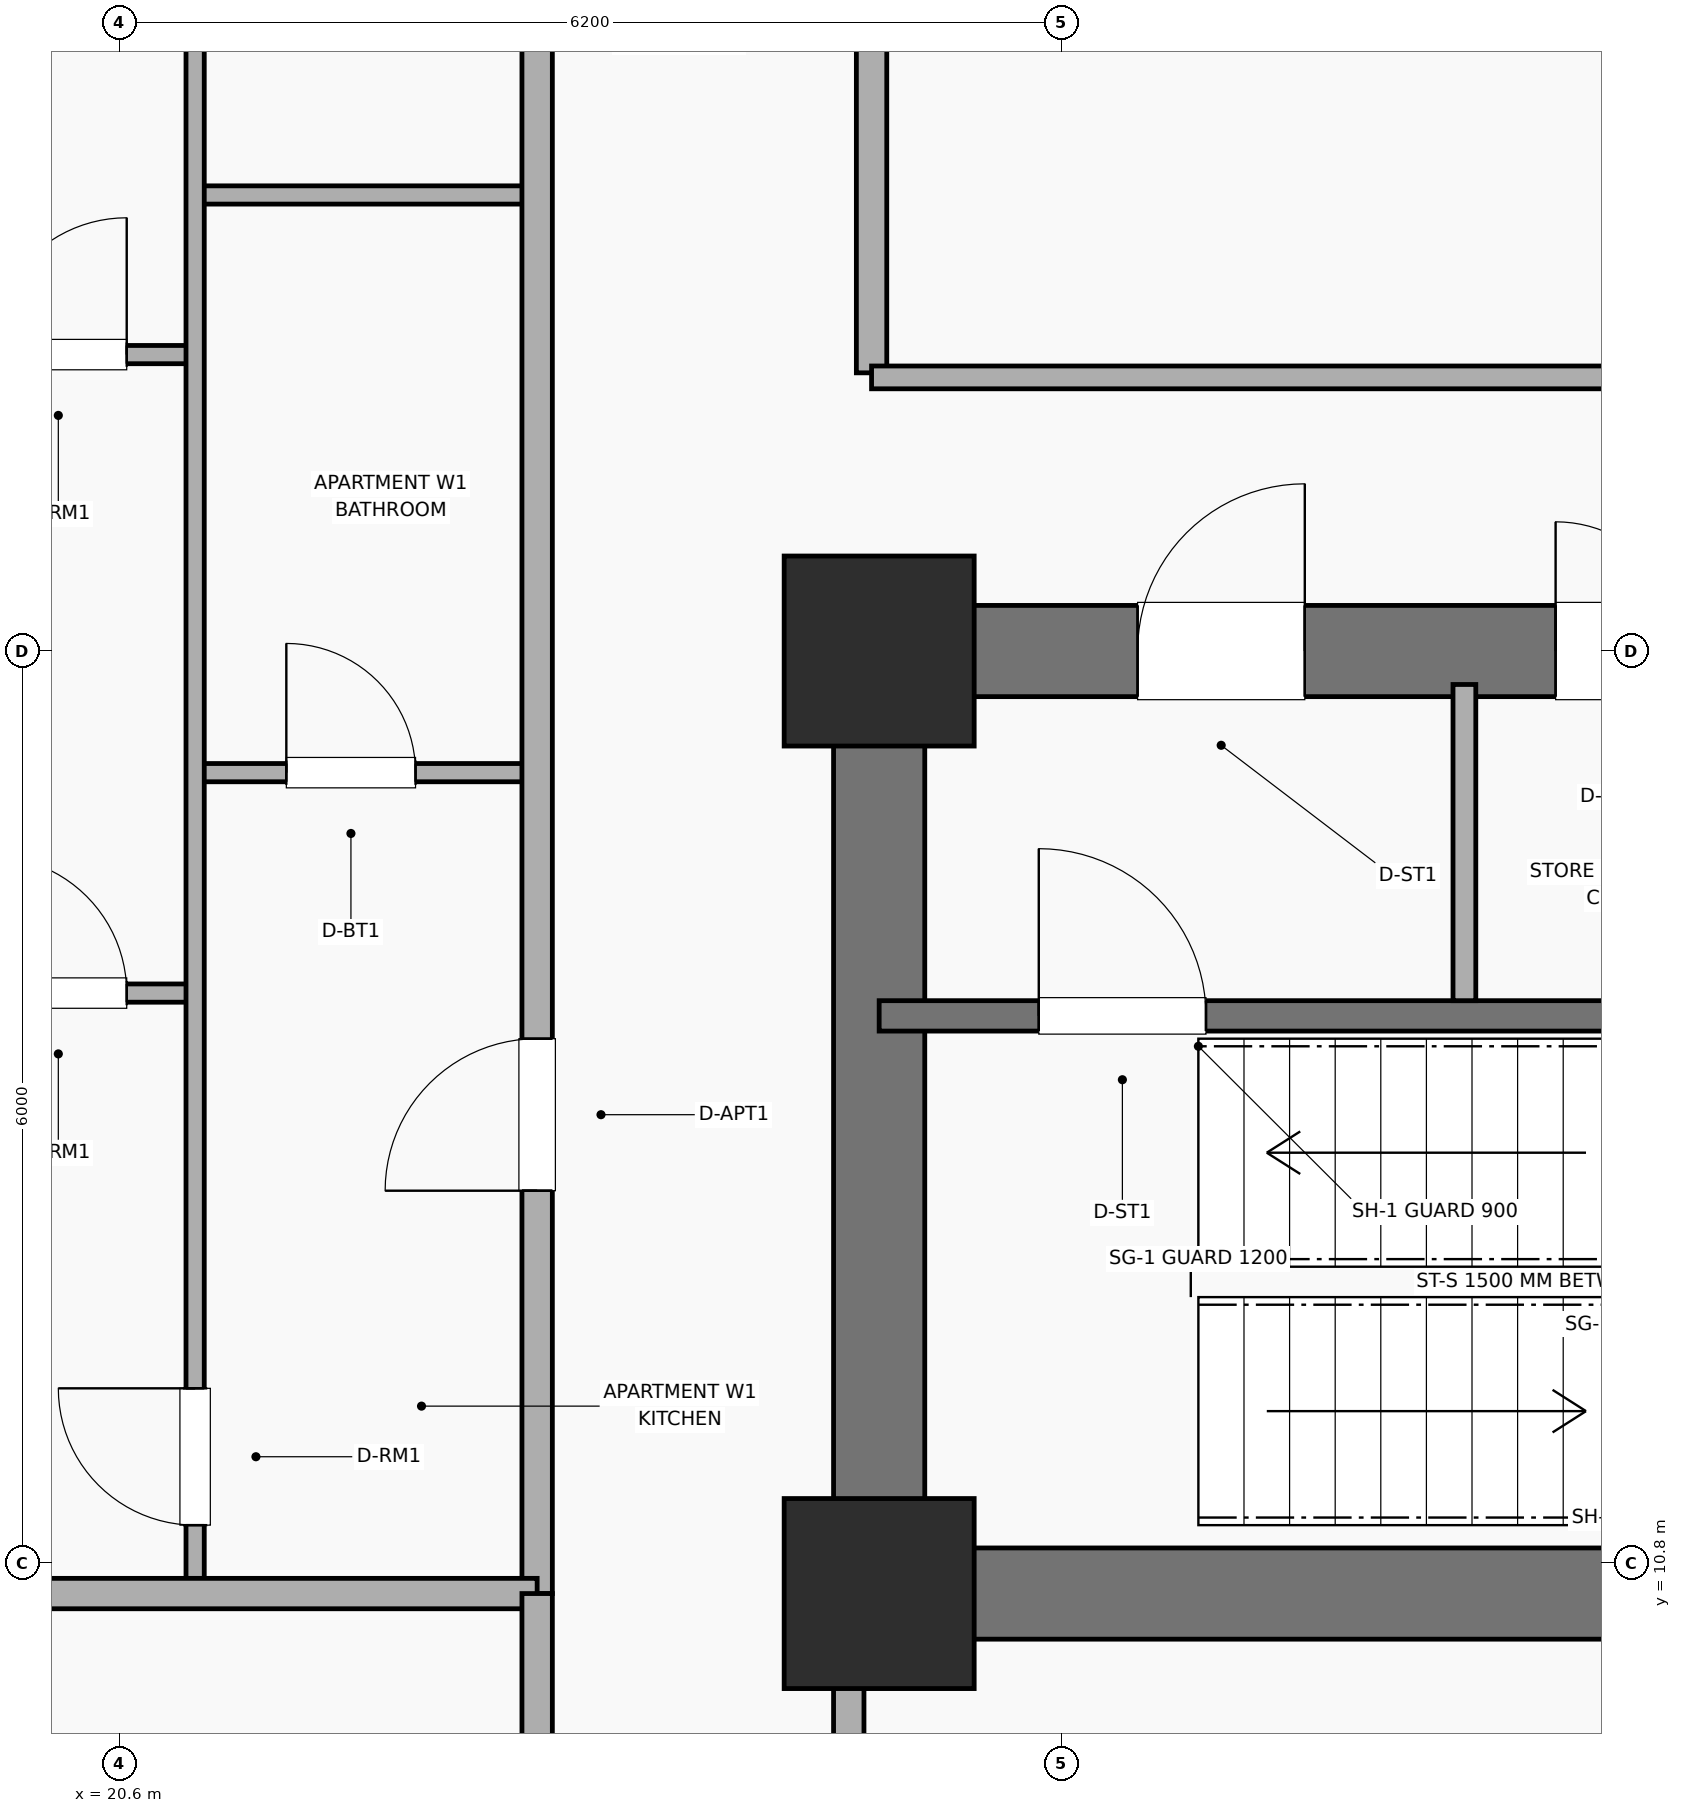
"""IFC4 building model, lengths in metres.
Left out: names, types, materials, properties, quantities, classifications, styles, units other than length and angle.
Written with IfcOpenShell. Run it as: python <this file> out.ifc"""

import sys

from ifc_helpers import new_model, si_unit, direction, frame, frame_2d, origin, origin_2d, place, context, subcontext, project, spatial, rectangle, extrude, element, fill, save


model = new_model("IFC4")
c1 = context("Model", 3, precision=1e-05, world=origin(), true_north=direction((0.0, 1.0)))
c2 = subcontext(c1, "Body", "Model", "MODEL_VIEW")
j1 = project(units=[si_unit("LENGTHUNIT", "METRE"), si_unit("PLANEANGLEUNIT", "RADIAN")], contexts=[c1])
p1 = place(None, origin())
s1 = spatial("IfcSite", under=j1, at=p1, CompositionType="ELEMENT")
p2 = place(p1, origin())
s2 = spatial("IfcBuilding", under=s1, at=p2, CompositionType="ELEMENT")
p3 = place(p2, frame((0.0, 0.0, 36.2)))
s3 = spatial("IfcBuildingStorey", under=s2, at=p3, CompositionType="ELEMENT", Elevation=36.2)
p4 = place(p3, frame((52.8, 10.6, 0.0), z_axis=(0.0, 0.0, 1.0), x_axis=(-1.0, 0.0, 0.0)))
e1 = element("IfcWall", 1, at=p4, inside=s3, PredefinedType="SHEAR", context=c2, shape_type="SweptSolid", body=[
    extrude(rectangle(XDim=27.2, YDim=0.6, at=frame_2d((13.6, 0.0))), origin(), (0.0, 0.0, 1.0), 3.7),
])
p5 = place(p3, frame((25.6, 10.9, 0.0), z_axis=(0.0, 0.0, 1.0), x_axis=(0.0, 1.0, 0.0)))
e2 = element("IfcWall", 2, at=p5, inside=s3, PredefinedType="SHEAR", context=c2, shape_type="SweptSolid", body=[
    extrude(rectangle(XDim=5.6, YDim=0.6, at=frame_2d((2.8, 0.0))), origin(), (0.0, 0.0, 1.0), 3.7),
])
p6 = place(p3, frame((25.6, 16.8, 0.0), z_axis=(0.0, 0.0, 1.0), x_axis=(1.0, 0.0, 0.0)))
e3 = element("IfcWall", 3, at=p6, inside=s3, PredefinedType="SHEAR", context=c2, shape_type="SweptSolid", body=[
    extrude(rectangle(XDim=27.2, YDim=0.6, at=frame_2d((13.6, 0.0))), origin(), (0.0, 0.0, 1.0), 3.7),
])
p7 = place(p6, frame((1.7, 0.0, 0.0)))
e4 = element("IfcOpeningElement", 4, at=p7, cuts=e3, PredefinedType="OPENING", context=c2, shape_type="SweptSolid", body=[
    extrude(rectangle(XDim=1.1, YDim=2.15, at=frame_2d((0.55, 1.075))), frame((0.0, 0.31, 0.0), z_axis=(0.0, -1.0, 0.0), x_axis=(1.0, 0.0, 0.0)), (0.0, 0.0, 1.0), 0.62),
])
p8 = place(p6, frame((4.45, 0.0, 0.0)))
e5 = element("IfcOpeningElement", 5, at=p8, cuts=e3, PredefinedType="OPENING", context=c2, shape_type="SweptSolid", body=[
    extrude(rectangle(XDim=0.85, YDim=2.1, at=frame_2d((0.425, 1.05))), frame((0.0, 0.31, 0.0), z_axis=(0.0, -1.0, 0.0), x_axis=(1.0, 0.0, 0.0)), (0.0, 0.0, 1.0), 0.62),
])
p9 = place(p6, frame((6.5, 0.0, 0.0)))
e6 = element("IfcOpeningElement", 6, at=p9, cuts=e3, PredefinedType="OPENING", context=c2, shape_type="SweptSolid", body=[
    extrude(rectangle(XDim=0.85, YDim=2.1, at=frame_2d((0.425, 1.05))), frame((0.0, 0.31, 0.0), z_axis=(0.0, -1.0, 0.0), x_axis=(1.0, 0.0, 0.0)), (0.0, 0.0, 1.0), 0.62),
])
p10 = place(p6, frame((13.0, 0.0, 0.0)))
e7 = element("IfcOpeningElement", 7, at=p10, cuts=e3, PredefinedType="OPENING", context=c2, shape_type="SweptSolid", body=[
    extrude(rectangle(XDim=1.2, YDim=2.15, at=frame_2d((0.6, 1.075))), frame((0.0, 0.31, 0.0), z_axis=(0.0, -1.0, 0.0), x_axis=(1.0, 0.0, 0.0)), (0.0, 0.0, 1.0), 0.62),
])
p11 = place(p6, frame((20.4, 0.0, 0.0)))
e8 = element("IfcOpeningElement", 8, at=p11, cuts=e3, PredefinedType="OPENING", context=c2, shape_type="SweptSolid", body=[
    extrude(rectangle(XDim=1.3, YDim=2.2, at=frame_2d((0.65, 1.1))), frame((0.0, 0.31, 0.0), z_axis=(0.0, -1.0, 0.0), x_axis=(1.0, 0.0, 0.0)), (0.0, 0.0, 1.0), 0.62),
])
p12 = place(p6, frame((24.65, 0.0, 0.0)))
e9 = element("IfcOpeningElement", 9, at=p12, cuts=e3, PredefinedType="OPENING", context=c2, shape_type="SweptSolid", body=[
    extrude(rectangle(XDim=0.85, YDim=2.1, at=frame_2d((0.425, 1.05))), frame((0.0, 0.31, 0.0), z_axis=(0.0, -1.0, 0.0), x_axis=(1.0, 0.0, 0.0)), (0.0, 0.0, 1.0), 0.62),
])
for number, where, z_axis, x_axis in (
    (10, (25.6, 10.6, 0.0), (0.0, 0.0, 1.0), (1.0, 0.0, 0.0)),
    (11, (25.6, 16.8, 0.0), (0.0, 0.0, 1.0), (1.0, 0.0, 0.0)),
):
    element("IfcColumn", number, at=place(p3, frame(where, z_axis=z_axis, x_axis=x_axis)), inside=s3, PredefinedType="COLUMN", context=c2, shape_type="SweptSolid", body=[
        extrude(rectangle(XDim=1.25, YDim=1.25, at=origin_2d()), origin(), (0.0, 0.0, 1.0), 3.7),
    ])
p13 = place(p3, frame((25.6, 14.4, 0.0), z_axis=(0.0, 0.0, 1.0), x_axis=(1.0, 0.0, 0.0)))
e12 = element("IfcWall", 12, at=p13, inside=s3, PredefinedType="SHEAR", context=c2, shape_type="SweptSolid", body=[
    extrude(rectangle(XDim=9.55, YDim=0.2, at=frame_2d((4.775, 0.0))), origin(), (0.0, 0.0, 1.0), 3.7),
])
p14 = place(p13, frame((1.05, 0.0, 0.0)))
e13 = element("IfcOpeningElement", 13, at=p14, cuts=e12, PredefinedType="OPENING", context=c2, shape_type="SweptSolid", body=[
    extrude(rectangle(XDim=1.1, YDim=2.15, at=frame_2d((0.55, 1.075))), frame((0.0, 0.11, 0.0), z_axis=(0.0, -1.0, 0.0), x_axis=(1.0, 0.0, 0.0)), (0.0, 0.0, 1.0), 0.22),
])
p15 = place(p3, frame((29.45, 14.5, 0.0), z_axis=(0.0, 0.0, 1.0), x_axis=(0.0, 1.0, 0.0)))
e14 = element("IfcWall", 14, at=p15, inside=s3, PredefinedType="PARTITIONING", context=c2, shape_type="SweptSolid", body=[
    extrude(rectangle(XDim=2.08, YDim=0.15, at=frame_2d((1.04, 0.0))), origin(), (0.0, 0.0, 1.0), 2.53),
])
p16 = place(p3, frame((25.55, 18.63, 0.0), z_axis=(0.0, 0.0, 1.0), x_axis=(0.0, 1.0, 0.0)))
e15 = element("IfcWall", 15, at=p16, inside=s3, PredefinedType="PARTITIONING", context=c2, shape_type="SweptSolid", body=[
    extrude(rectangle(XDim=19.14, YDim=0.2, at=frame_2d((9.57, 0.0))), origin(), (0.0, 0.0, 1.0), 2.53),
])
p17 = place(p3, frame((25.55, 18.6, 0.0), z_axis=(0.0, 0.0, 1.0), x_axis=(1.0, 0.0, 0.0)))
e16 = element("IfcWall", 16, at=p17, inside=s3, PredefinedType="PARTITIONING", context=c2, shape_type="SweptSolid", body=[
    extrude(rectangle(XDim=14.9, YDim=0.15, at=frame_2d((7.45, 0.0))), origin(), (0.0, 0.0, 1.0), 2.53),
])
p18 = place(p3, frame((21.1, 16.0, 0.0), z_axis=(0.0, 0.0, 1.0), x_axis=(1.0, 0.0, 0.0)))
e17 = element("IfcWall", 17, at=p18, inside=s3, PredefinedType="PARTITIONING", context=c2, shape_type="SweptSolid", body=[
    extrude(rectangle(XDim=2.25, YDim=0.12, at=frame_2d((1.125, 0.0))), origin(), (0.0, 0.0, 1.0), 2.53),
])
p19 = place(p18, frame((0.6, 0.0, 0.0)))
e18 = element("IfcOpeningElement", 18, at=p19, cuts=e17, PredefinedType="OPENING", context=c2, shape_type="SweptSolid", body=[
    extrude(rectangle(XDim=0.85, YDim=2.1, at=frame_2d((0.425, 1.05))), frame((0.0, 0.07, 0.0), z_axis=(0.0, -1.0, 0.0), x_axis=(1.0, 0.0, 0.0)), (0.0, 0.0, 1.0), 0.14),
])
p20 = place(p3, frame((21.1, 19.8, 0.0), z_axis=(0.0, 0.0, 1.0), x_axis=(1.0, 0.0, 0.0)))
e19 = element("IfcWall", 19, at=p20, inside=s3, PredefinedType="PARTITIONING", context=c2, shape_type="SweptSolid", body=[
    extrude(rectangle(XDim=2.25, YDim=0.12, at=frame_2d((1.125, 0.0))), origin(), (0.0, 0.0, 1.0), 2.53),
])
p21 = place(p3, frame((14.57, 14.55, 0.0), z_axis=(0.0, 0.0, 1.0), x_axis=(1.0, 0.0, 0.0)))
e20 = element("IfcWall", 20, at=p21, inside=s3, PredefinedType="PARTITIONING", context=c2, shape_type="SweptSolid", body=[
    extrude(rectangle(XDim=6.53, YDim=0.12, at=frame_2d((3.265, 0.0))), origin(), (0.0, 0.0, 1.0), 2.53),
])
p22 = place(p21, frame((5.18, 0.0, 0.0)))
e21 = element("IfcOpeningElement", 21, at=p22, cuts=e20, PredefinedType="OPENING", context=c2, shape_type="SweptSolid", body=[
    extrude(rectangle(XDim=0.9, YDim=2.1, at=frame_2d((0.45, 1.05))), frame((0.0, 0.07, 0.0), z_axis=(0.0, -1.0, 0.0), x_axis=(1.0, 0.0, 0.0)), (0.0, 0.0, 1.0), 0.14),
])
p23 = place(p3, frame((14.57, 18.75, 0.0), z_axis=(0.0, 0.0, 1.0), x_axis=(1.0, 0.0, 0.0)))
e22 = element("IfcWall", 22, at=p23, inside=s3, PredefinedType="PARTITIONING", context=c2, shape_type="SweptSolid", body=[
    extrude(rectangle(XDim=6.53, YDim=0.12, at=frame_2d((3.265, 0.0))), origin(), (0.0, 0.0, 1.0), 2.53),
])
p24 = place(p23, frame((5.18, 0.0, 0.0)))
e23 = element("IfcOpeningElement", 23, at=p24, cuts=e22, PredefinedType="OPENING", context=c2, shape_type="SweptSolid", body=[
    extrude(rectangle(XDim=0.9, YDim=2.1, at=frame_2d((0.45, 1.05))), frame((0.0, 0.07, 0.0), z_axis=(0.0, -1.0, 0.0), x_axis=(1.0, 0.0, 0.0)), (0.0, 0.0, 1.0), 0.14),
])
p25 = place(p3, frame((21.1, 10.64, 0.0), z_axis=(0.0, 0.0, 1.0), x_axis=(0.0, 1.0, 0.0)))
e24 = element("IfcWall", 24, at=p25, inside=s3, PredefinedType="PARTITIONING", context=c2, shape_type="SweptSolid", body=[
    extrude(rectangle(XDim=12.02, YDim=0.12, at=frame_2d((6.01, 0.0))), origin(), (0.0, 0.0, 1.0), 2.53),
])
p26 = place(p25, frame((0.41, 0.0, 0.0)))
e25 = element("IfcOpeningElement", 25, at=p26, cuts=e24, PredefinedType="OPENING", context=c2, shape_type="SweptSolid", body=[
    extrude(rectangle(XDim=0.9, YDim=2.1, at=frame_2d((0.45, 1.05))), frame((0.0, 0.07, 0.0), z_axis=(0.0, -1.0, 0.0), x_axis=(1.0, 0.0, 0.0)), (0.0, 0.0, 1.0), 0.14),
])
p27 = place(p25, frame((10.185, 0.0, 0.0)))
e26 = element("IfcOpeningElement", 26, at=p27, cuts=e24, PredefinedType="OPENING", context=c2, shape_type="SweptSolid", body=[
    extrude(rectangle(XDim=0.82, YDim=2.08, at=frame_2d((0.41, 1.04))), frame((0.0, 0.07, 0.0), z_axis=(0.0, -1.0, 0.0), x_axis=(1.0, 0.0, 0.0)), (0.0, 0.0, 1.0), 0.14),
])
p28 = place(p3, frame((23.35, 10.6, 0.0), z_axis=(0.0, 0.0, 1.0), x_axis=(0.0, 1.0, 0.0)))
e27 = element("IfcWall", 27, at=p28, inside=s3, PredefinedType="PARTITIONING", context=c2, shape_type="SweptSolid", body=[
    extrude(rectangle(XDim=35.2, YDim=0.2, at=frame_2d((17.6, 0.0))), origin(), (0.0, 0.0, 1.0), 2.53),
])
p29 = place(p28, frame((2.65, 0.0, 0.0)))
e28 = element("IfcOpeningElement", 28, at=p29, cuts=e27, PredefinedType="OPENING", context=c2, shape_type="SweptSolid", body=[
    extrude(rectangle(XDim=1.0, YDim=2.15, at=frame_2d((0.5, 1.075))), frame((0.0, 0.11, 0.0), z_axis=(0.0, -1.0, 0.0), x_axis=(1.0, 0.0, 0.0)), (0.0, 0.0, 1.0), 0.22),
])
p30 = place(p28, frame((12.65, 0.0, 0.0)))
e29 = element("IfcOpeningElement", 29, at=p30, cuts=e27, PredefinedType="OPENING", context=c2, shape_type="SweptSolid", body=[
    extrude(rectangle(XDim=1.0, YDim=2.15, at=frame_2d((0.5, 1.075))), frame((0.0, 0.11, 0.0), z_axis=(0.0, -1.0, 0.0), x_axis=(1.0, 0.0, 0.0)), (0.0, 0.0, 1.0), 0.22),
])
p31 = place(p28, frame((24.134, 0.0, 0.0)))
e30 = element("IfcOpeningElement", 30, at=p31, cuts=e27, PredefinedType="OPENING", context=c2, shape_type="SweptSolid", body=[
    extrude(rectangle(XDim=1.0, YDim=2.15, at=frame_2d((0.5, 1.075))), frame((0.0, 0.11, 0.0), z_axis=(0.0, -1.0, 0.0), x_axis=(1.0, 0.0, 0.0)), (0.0, 0.0, 1.0), 0.22),
])
p32 = place(p3, frame((14.99, 10.6, 0.0), z_axis=(0.0, 0.0, 1.0), x_axis=(1.0, 0.0, 0.0)))
e31 = element("IfcWall", 31, at=p32, inside=s3, PredefinedType="PARTITIONING", context=c2, shape_type="SweptSolid", body=[
    extrude(rectangle(XDim=8.36, YDim=0.2, at=frame_2d((4.18, 0.0))), origin(), (0.0, 0.0, 1.0), 2.53),
])
p33 = place(p3, frame((23.35, 4.97, 0.0), z_axis=(0.0, 0.0, 1.0), x_axis=(0.0, 1.0, 0.0)))
e32 = element("IfcWall", 32, at=p33, inside=s3, PredefinedType="PARTITIONING", context=c2, shape_type="SweptSolid", body=[
    extrude(rectangle(XDim=5.63, YDim=0.2, at=frame_2d((2.815, 0.0))), origin(), (0.0, 0.0, 1.0), 2.53),
])
p34 = place(p3, frame((25.4, 5.92, 0.0), z_axis=(0.0, 0.0, 1.0), x_axis=(0.0, 1.0, 0.0)))
e33 = element("IfcWall", 33, at=p34, inside=s3, PredefinedType="PARTITIONING", context=c2, shape_type="SweptSolid", body=[
    extrude(rectangle(XDim=4.38, YDim=0.2, at=frame_2d((2.19, 0.0))), origin(), (0.0, 0.0, 1.0), 2.53),
])
p35 = place(p34, frame((0.85, 0.0, 0.0)))
e34 = element("IfcOpeningElement", 34, at=p35, cuts=e33, PredefinedType="OPENING", context=c2, shape_type="SweptSolid", body=[
    extrude(rectangle(XDim=0.9, YDim=2.1, at=frame_2d((0.45, 1.05))), frame((0.0, 0.11, 0.0), z_axis=(0.0, -1.0, 0.0), x_axis=(1.0, 0.0, 0.0)), (0.0, 0.0, 1.0), 0.22),
])
p36 = place(p14, origin())
e35 = element("IfcDoor", 35, at=p36, inside=s3, OperationType="SINGLE_SWING_LEFT", PredefinedType="DOOR", context=c2, shape_type="SweptSolid", body=[
    extrude(rectangle(XDim=1.1, YDim=2.15, at=frame_2d((0.55, 1.075))), frame((0.0, 0.025, 0.0), z_axis=(0.0, -1.0, 0.0), x_axis=(1.0, 0.0, 0.0)), (0.0, 0.0, 1.0), 0.05),
])
fill(e13, e35)
p37 = place(p19, origin())
e36 = element("IfcDoor", 36, at=p37, inside=s3, OperationType="SINGLE_SWING_LEFT", PredefinedType="DOOR", context=c2, shape_type="SweptSolid", body=[
    extrude(rectangle(XDim=0.85, YDim=2.1, at=frame_2d((0.425, 1.05))), frame((0.0, 0.025, 0.0), z_axis=(0.0, -1.0, 0.0), x_axis=(1.0, 0.0, 0.0)), (0.0, 0.0, 1.0), 0.05),
])
fill(e18, e36)
p38 = place(p22, origin())
e37 = element("IfcDoor", 37, at=p38, inside=s3, OperationType="SINGLE_SWING_LEFT", PredefinedType="DOOR", context=c2, shape_type="SweptSolid", body=[
    extrude(rectangle(XDim=0.9, YDim=2.1, at=frame_2d((0.45, 1.05))), frame((0.0, 0.025, 0.0), z_axis=(0.0, -1.0, 0.0), x_axis=(1.0, 0.0, 0.0)), (0.0, 0.0, 1.0), 0.05),
])
fill(e21, e37)
p39 = place(p24, origin())
e38 = element("IfcDoor", 38, at=p39, inside=s3, OperationType="SINGLE_SWING_RIGHT", PredefinedType="DOOR", context=c2, shape_type="SweptSolid", body=[
    extrude(rectangle(XDim=0.9, YDim=2.1, at=frame_2d((0.45, 1.05))), frame((0.0, 0.025, 0.0), z_axis=(0.0, -1.0, 0.0), x_axis=(1.0, 0.0, 0.0)), (0.0, 0.0, 1.0), 0.05),
])
fill(e23, e38)
p40 = place(p26, origin())
e39 = element("IfcDoor", 39, at=p40, inside=s3, OperationType="SINGLE_SWING_RIGHT", PredefinedType="DOOR", context=c2, shape_type="SweptSolid", body=[
    extrude(rectangle(XDim=0.9, YDim=2.1, at=frame_2d((0.45, 1.05))), frame((0.0, 0.025, 0.0), z_axis=(0.0, -1.0, 0.0), x_axis=(1.0, 0.0, 0.0)), (0.0, 0.0, 1.0), 0.05),
])
fill(e25, e39)
p41 = place(p29, origin())
e40 = element("IfcDoor", 40, at=p41, inside=s3, OperationType="SINGLE_SWING_LEFT", PredefinedType="DOOR", context=c2, shape_type="SweptSolid", body=[
    extrude(rectangle(XDim=1.0, YDim=2.15, at=frame_2d((0.5, 1.075))), frame((0.0, 0.025, 0.0), z_axis=(0.0, -1.0, 0.0), x_axis=(1.0, 0.0, 0.0)), (0.0, 0.0, 1.0), 0.05),
])
fill(e28, e40)
p42 = place(p7, origin())
e41 = element("IfcDoor", 41, at=p42, inside=s3, OperationType="SINGLE_SWING_RIGHT", PredefinedType="DOOR", context=c2, shape_type="SweptSolid", body=[
    extrude(rectangle(XDim=1.1, YDim=2.15, at=frame_2d((0.55, 1.075))), frame((0.0, 0.025, 0.0), z_axis=(0.0, -1.0, 0.0), x_axis=(1.0, 0.0, 0.0)), (0.0, 0.0, 1.0), 0.05),
])
fill(e4, e41)
p43 = place(p8, origin())
e42 = element("IfcDoor", 42, at=p43, inside=s3, OperationType="SINGLE_SWING_LEFT", PredefinedType="DOOR", context=c2, shape_type="SweptSolid", body=[
    extrude(rectangle(XDim=0.85, YDim=2.1, at=frame_2d((0.425, 1.05))), frame((0.0, 0.025, 0.0), z_axis=(0.0, -1.0, 0.0), x_axis=(1.0, 0.0, 0.0)), (0.0, 0.0, 1.0), 0.05),
])
fill(e5, e42)
save(model, sys.argv[1])
